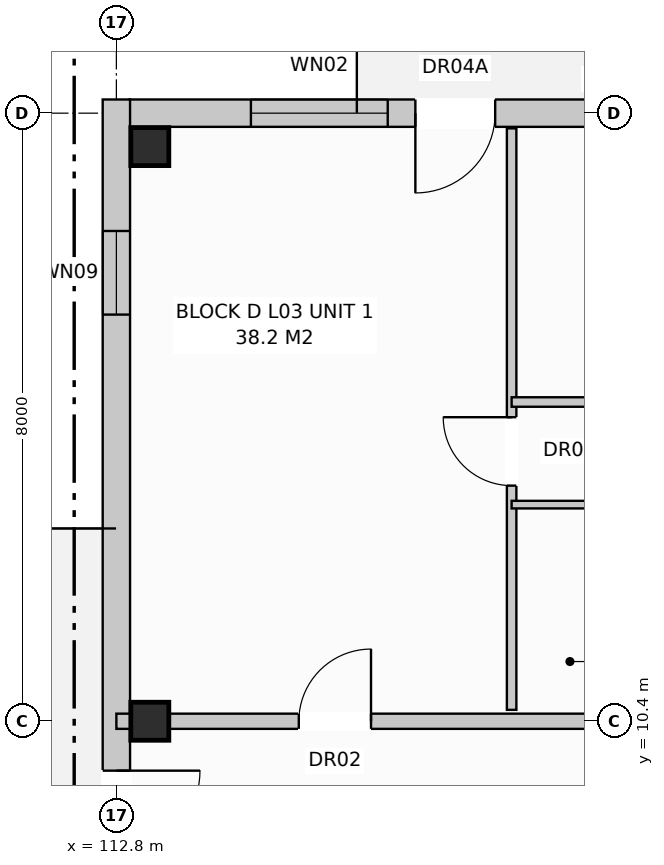
"""IFC4 building model, lengths in metres.
Left out: names, types, materials, properties, quantities, classifications, styles, units other than length and angle.
Written with IfcOpenShell. Run it as: python <this file> out.ifc"""

import sys

from ifc_helpers import new_model, si_unit, direction, frame, frame_2d, origin, origin_with_axes, origin_2d, place, context, subcontext, project, spatial, rectangle, extrude, element, fill, save


model = new_model("IFC4")
c1 = context("Model", 3, precision=1e-05, world=origin(), true_north=direction((0.0, 1.0)))
c2 = subcontext(c1, "Body", "Model", "MODEL_VIEW")
j1 = project(units=[si_unit("LENGTHUNIT", "METRE"), si_unit("PLANEANGLEUNIT", "RADIAN")], contexts=[c1])
p1 = place(None, origin())
s1 = spatial("IfcSite", under=j1, at=p1, CompositionType="ELEMENT")
p2 = place(p1, origin())
s2 = spatial("IfcBuilding", under=s1, at=p2, CompositionType="ELEMENT")
p3 = place(p2, frame((0.0, 0.0, 11.2)))
s3 = spatial("IfcBuildingStorey", under=s2, at=p3, CompositionType="ELEMENT", Elevation=11.2)
for number, where, z_axis, x_axis in (
    (1, (113.24, 10.4, 0.0), (0.0, 0.0, 1.0), (1.0, 0.0, 0.0)),
    (2, (113.24, 17.96, 0.0), (0.0, 0.0, 1.0), (1.0, 0.0, 0.0)),
):
    element("IfcColumn", number, at=place(p3, frame(where, z_axis=z_axis, x_axis=x_axis)), inside=s3, PredefinedType="COLUMN", context=c2, shape_type="SweptSolid", body=[
        extrude(rectangle(XDim=0.5, YDim=0.5, at=origin_2d()), origin(), (0.0, 0.0, 1.0), 3.2),
    ])
p4 = place(p3, frame((112.97, 18.4, 0.0), z_axis=(0.0, 0.0, 1.0), x_axis=(1.0, 0.0, 0.0)))
e3 = element("IfcWall", 3, at=p4, inside=s3, PredefinedType="STANDARD", context=c2, shape_type="SweptSolid", body=[
    extrude(rectangle(XDim=14.08, YDim=0.36, at=frame_2d((7.04, 0.0))), origin(), (0.0, 0.0, 1.0), 2.94),
])
p5 = place(p4, frame((3.764, 0.0, 0.0)))
e4 = element("IfcOpeningElement", 4, at=p5, cuts=e3, PredefinedType="OPENING", context=c2, shape_type="SweptSolid", body=[
    extrude(rectangle(XDim=1.05, YDim=2.12, at=frame_2d((0.525, 1.06))), frame((0.0, 0.192, 0.0), z_axis=(0.0, -1.0, 0.0), x_axis=(1.0, 0.0, 0.0)), (0.0, 0.0, 1.0), 0.384),
])
p6 = place(p4, frame((1.6, 0.0, 0.8)))
e5 = element("IfcOpeningElement", 5, at=p6, cuts=e3, PredefinedType="OPENING", context=c2, shape_type="SweptSolid", body=[
    extrude(rectangle(XDim=1.8, YDim=1.7, at=frame_2d((0.9, 0.85))), frame((0.0, 0.192, 0.0), z_axis=(0.0, -1.0, 0.0), x_axis=(1.0, 0.0, 0.0)), (0.0, 0.0, 1.0), 0.384),
])
p7 = place(p4, frame((7.65, 0.0, 0.72)))
e6 = element("IfcOpeningElement", 6, at=p7, cuts=e3, PredefinedType="OPENING", context=c2, shape_type="SweptSolid", body=[
    extrude(rectangle(XDim=1.1, YDim=1.5, at=frame_2d((0.55, 0.75))), frame((0.0, 0.192, 0.0), z_axis=(0.0, -1.0, 0.0), x_axis=(1.0, 0.0, 0.0)), (0.0, 0.0, 1.0), 0.384),
])
p8 = place(p4, frame((10.425, 0.0, 0.8)))
e7 = element("IfcOpeningElement", 7, at=p8, cuts=e3, PredefinedType="OPENING", context=c2, shape_type="SweptSolid", body=[
    extrude(rectangle(XDim=1.95, YDim=1.65, at=frame_2d((0.975, 0.825))), frame((0.0, 0.192, 0.0), z_axis=(0.0, -1.0, 0.0), x_axis=(1.0, 0.0, 0.0)), (0.0, 0.0, 1.0), 0.384),
])
p9 = place(p3, frame((112.8, -0.18, 0.0), z_axis=(0.0, 0.0, 1.0), x_axis=(0.0, 1.0, 0.0)))
e8 = element("IfcWall", 8, at=p9, inside=s3, PredefinedType="STANDARD", context=c2, shape_type="SweptSolid", body=[
    extrude(rectangle(XDim=18.76, YDim=0.36, at=frame_2d((9.38, 0.0))), origin(), (0.0, 0.0, 1.0), 2.94),
])
p10 = place(p9, frame((8.83, 0.0, 0.0)))
e9 = element("IfcOpeningElement", 9, at=p10, cuts=e8, PredefinedType="OPENING", context=c2, shape_type="SweptSolid", body=[
    extrude(rectangle(XDim=1.1, YDim=2.1, at=frame_2d((0.55, 1.05))), frame((0.0, 0.192, 0.0), z_axis=(0.0, -1.0, 0.0), x_axis=(1.0, 0.0, 0.0)), (0.0, 0.0, 1.0), 0.384),
])
p11 = place(p9, frame((1.73, 0.0, 0.72)))
e10 = element("IfcOpeningElement", 10, at=p11, cuts=e8, PredefinedType="OPENING", context=c2, shape_type="SweptSolid", body=[
    extrude(rectangle(XDim=1.1, YDim=1.5, at=frame_2d((0.55, 0.75))), frame((0.0, 0.192, 0.0), z_axis=(0.0, -1.0, 0.0), x_axis=(1.0, 0.0, 0.0)), (0.0, 0.0, 1.0), 0.384),
])
p12 = place(p9, frame((15.93, 0.0, 0.72)))
e11 = element("IfcOpeningElement", 11, at=p12, cuts=e8, PredefinedType="OPENING", context=c2, shape_type="SweptSolid", body=[
    extrude(rectangle(XDim=1.1, YDim=1.5, at=frame_2d((0.55, 0.75))), frame((0.0, 0.192, 0.0), z_axis=(0.0, -1.0, 0.0), x_axis=(1.0, 0.0, 0.0)), (0.0, 0.0, 1.0), 0.384),
])
p13 = place(p3, frame((112.8, 10.4, 0.0), z_axis=(0.0, 0.0, 1.0), x_axis=(1.0, 0.0, 0.0)))
e12 = element("IfcWall", 12, at=p13, inside=s3, PredefinedType="PARTITIONING", context=c2, shape_type="SweptSolid", body=[
    extrude(rectangle(XDim=13.8, YDim=0.2, at=frame_2d((6.9, 0.0))), origin(), (0.0, 0.0, 1.0), 2.38),
])
p14 = place(p13, frame((2.4, 0.0, 0.0)))
e13 = element("IfcOpeningElement", 13, at=p14, cuts=e12, PredefinedType="OPENING", context=c2, shape_type="SweptSolid", body=[
    extrude(rectangle(XDim=0.95, YDim=2.15, at=frame_2d((0.475, 1.075))), frame((0.0, 0.112, 0.0), z_axis=(0.0, -1.0, 0.0), x_axis=(1.0, 0.0, 0.0)), (0.0, 0.0, 1.0), 0.224),
])
p15 = place(p3, frame((118.0, 10.55, 0.0), z_axis=(0.0, 0.0, 1.0), x_axis=(0.0, 1.0, 0.0)))
e14 = element("IfcWall", 14, at=p15, inside=s3, PredefinedType="PARTITIONING", context=c2, shape_type="SweptSolid", body=[
    extrude(rectangle(XDim=7.65, YDim=0.125, at=frame_2d((3.825, 0.0))), origin(), (0.0, 0.0, 1.0), 2.94),
])
p16 = place(p15, frame((2.95, 0.0, 0.0)))
e15 = element("IfcOpeningElement", 15, at=p16, cuts=e14, PredefinedType="OPENING", context=c2, shape_type="SweptSolid", body=[
    extrude(rectangle(XDim=0.9, YDim=2.1, at=frame_2d((0.45, 1.05))), frame((0.0, 0.074, 0.0), z_axis=(0.0, -1.0, 0.0), x_axis=(1.0, 0.0, 0.0)), (0.0, 0.0, 1.0), 0.149),
])
p17 = place(p3, frame((118.0, 13.25, 0.0), z_axis=(0.0, 0.0, 1.0), x_axis=(1.0, 0.0, 0.0)))
e16 = element("IfcWall", 16, at=p17, inside=s3, PredefinedType="PARTITIONING", context=c2, shape_type="SweptSolid", body=[
    extrude(rectangle(XDim=8.5, YDim=0.1, at=frame_2d((4.25, 0.0))), origin(), (0.0, 0.0, 1.0), 2.94),
])
p18 = place(p17, frame((1.0, 0.0, 0.0)))
e17 = element("IfcOpeningElement", 17, at=p18, cuts=e16, PredefinedType="OPENING", context=c2, shape_type="SweptSolid", body=[
    extrude(rectangle(XDim=0.85, YDim=2.1, at=frame_2d((0.425, 1.05))), frame((0.0, 0.062, 0.0), z_axis=(0.0, -1.0, 0.0), x_axis=(1.0, 0.0, 0.0)), (0.0, 0.0, 1.0), 0.124),
])
p19 = place(p17, frame((3.4, 0.0, 0.0)))
e18 = element("IfcOpeningElement", 18, at=p19, cuts=e16, PredefinedType="OPENING", context=c2, shape_type="SweptSolid", body=[
    extrude(rectangle(XDim=0.85, YDim=2.05, at=frame_2d((0.425, 1.025))), frame((0.0, 0.062, 0.0), z_axis=(0.0, -1.0, 0.0), x_axis=(1.0, 0.0, 0.0)), (0.0, 0.0, 1.0), 0.124),
])
p20 = place(p17, frame((6.2, 0.0, 0.0)))
e19 = element("IfcOpeningElement", 19, at=p20, cuts=e16, PredefinedType="OPENING", context=c2, shape_type="SweptSolid", body=[
    extrude(rectangle(XDim=0.85, YDim=2.05, at=frame_2d((0.425, 1.025))), frame((0.0, 0.062, 0.0), z_axis=(0.0, -1.0, 0.0), x_axis=(1.0, 0.0, 0.0)), (0.0, 0.0, 1.0), 0.124),
])
p21 = place(p3, frame((118.0, 14.6, 0.0), z_axis=(0.0, 0.0, 1.0), x_axis=(1.0, 0.0, 0.0)))
e20 = element("IfcWall", 20, at=p21, inside=s3, PredefinedType="PARTITIONING", context=c2, shape_type="SweptSolid", body=[
    extrude(rectangle(XDim=8.5, YDim=0.125, at=frame_2d((4.25, 0.0))), origin(), (0.0, 0.0, 1.0), 2.94),
])
p22 = place(p21, frame((1.5, 0.0, 0.0)))
e21 = element("IfcOpeningElement", 21, at=p22, cuts=e20, PredefinedType="OPENING", context=c2, shape_type="SweptSolid", body=[
    extrude(rectangle(XDim=0.9, YDim=2.1, at=frame_2d((0.45, 1.05))), frame((0.0, 0.074, 0.0), z_axis=(0.0, -1.0, 0.0), x_axis=(1.0, 0.0, 0.0)), (0.0, 0.0, 1.0), 0.149),
])
p23 = place(p21, frame((5.6, 0.0, 0.0)))
e22 = element("IfcOpeningElement", 22, at=p23, cuts=e20, PredefinedType="OPENING", context=c2, shape_type="SweptSolid", body=[
    extrude(rectangle(XDim=0.9, YDim=2.1, at=frame_2d((0.45, 1.05))), frame((0.0, 0.074, 0.0), z_axis=(0.0, -1.0, 0.0), x_axis=(1.0, 0.0, 0.0)), (0.0, 0.0, 1.0), 0.149),
])
p24 = place(p5, frame((1.05, 0.0, 0.0), z_axis=(0.0, 0.0, 1.0), x_axis=(-1.0, 0.0, 0.0)))
e23 = element("IfcDoor", 23, at=p24, inside=s3, OperationType="SINGLE_SWING_LEFT", PredefinedType="DOOR", context=c2, shape_type="SweptSolid", body=[
    extrude(rectangle(XDim=1.05, YDim=2.12, at=frame_2d((0.525, 1.06))), frame((0.0, 0.025, 0.0), z_axis=(0.0, -1.0, 0.0), x_axis=(1.0, 0.0, 0.0)), (0.0, 0.0, 1.0), 0.05),
])
fill(e4, e23)
p25 = place(p6, origin_with_axes())
e24 = element("IfcWindow", 24, at=p25, inside=s3, PartitioningType="SINGLE_PANEL", PredefinedType="WINDOW", context=c2, shape_type="SweptSolid", body=[
    extrude(rectangle(XDim=1.8, YDim=1.7, at=frame_2d((0.9, 0.85))), frame((0.0, 0.03, 0.0), z_axis=(0.0, -1.0, 0.0), x_axis=(1.0, 0.0, 0.0)), (0.0, 0.0, 1.0), 0.06),
])
fill(e5, e24)
p26 = place(p10, frame((1.1, 0.0, 0.0), z_axis=(0.0, 0.0, 1.0), x_axis=(-1.0, 0.0, 0.0)))
e25 = element("IfcDoor", 25, at=p26, inside=s3, OperationType="SINGLE_SWING_RIGHT", PredefinedType="DOOR", context=c2, shape_type="SweptSolid", body=[
    extrude(rectangle(XDim=1.1, YDim=2.1, at=frame_2d((0.55, 1.05))), frame((0.0, 0.025, 0.0), z_axis=(0.0, -1.0, 0.0), x_axis=(1.0, 0.0, 0.0)), (0.0, 0.0, 1.0), 0.05),
])
fill(e9, e25)
p27 = place(p12, origin_with_axes())
e26 = element("IfcWindow", 26, at=p27, inside=s3, PartitioningType="SINGLE_PANEL", PredefinedType="WINDOW", context=c2, shape_type="SweptSolid", body=[
    extrude(rectangle(XDim=1.1, YDim=1.5, at=frame_2d((0.55, 0.75))), frame((0.0, 0.03, 0.0), z_axis=(0.0, -1.0, 0.0), x_axis=(1.0, 0.0, 0.0)), (0.0, 0.0, 1.0), 0.06),
])
fill(e11, e26)
p28 = place(p14, origin_with_axes())
e27 = element("IfcDoor", 27, at=p28, inside=s3, OperationType="SINGLE_SWING_RIGHT", PredefinedType="DOOR", context=c2, shape_type="SweptSolid", body=[
    extrude(rectangle(XDim=0.95, YDim=2.15, at=frame_2d((0.475, 1.075))), frame((0.0, 0.025, 0.0), z_axis=(0.0, -1.0, 0.0), x_axis=(1.0, 0.0, 0.0)), (0.0, 0.0, 1.0), 0.05),
])
fill(e13, e27)
p29 = place(p16, origin_with_axes())
e28 = element("IfcDoor", 28, at=p29, inside=s3, OperationType="SINGLE_SWING_RIGHT", PredefinedType="DOOR", context=c2, shape_type="SweptSolid", body=[
    extrude(rectangle(XDim=0.9, YDim=2.1, at=frame_2d((0.45, 1.05))), frame((0.0, 0.025, 0.0), z_axis=(0.0, -1.0, 0.0), x_axis=(1.0, 0.0, 0.0)), (0.0, 0.0, 1.0), 0.05),
])
fill(e15, e28)
save(model, sys.argv[1])
